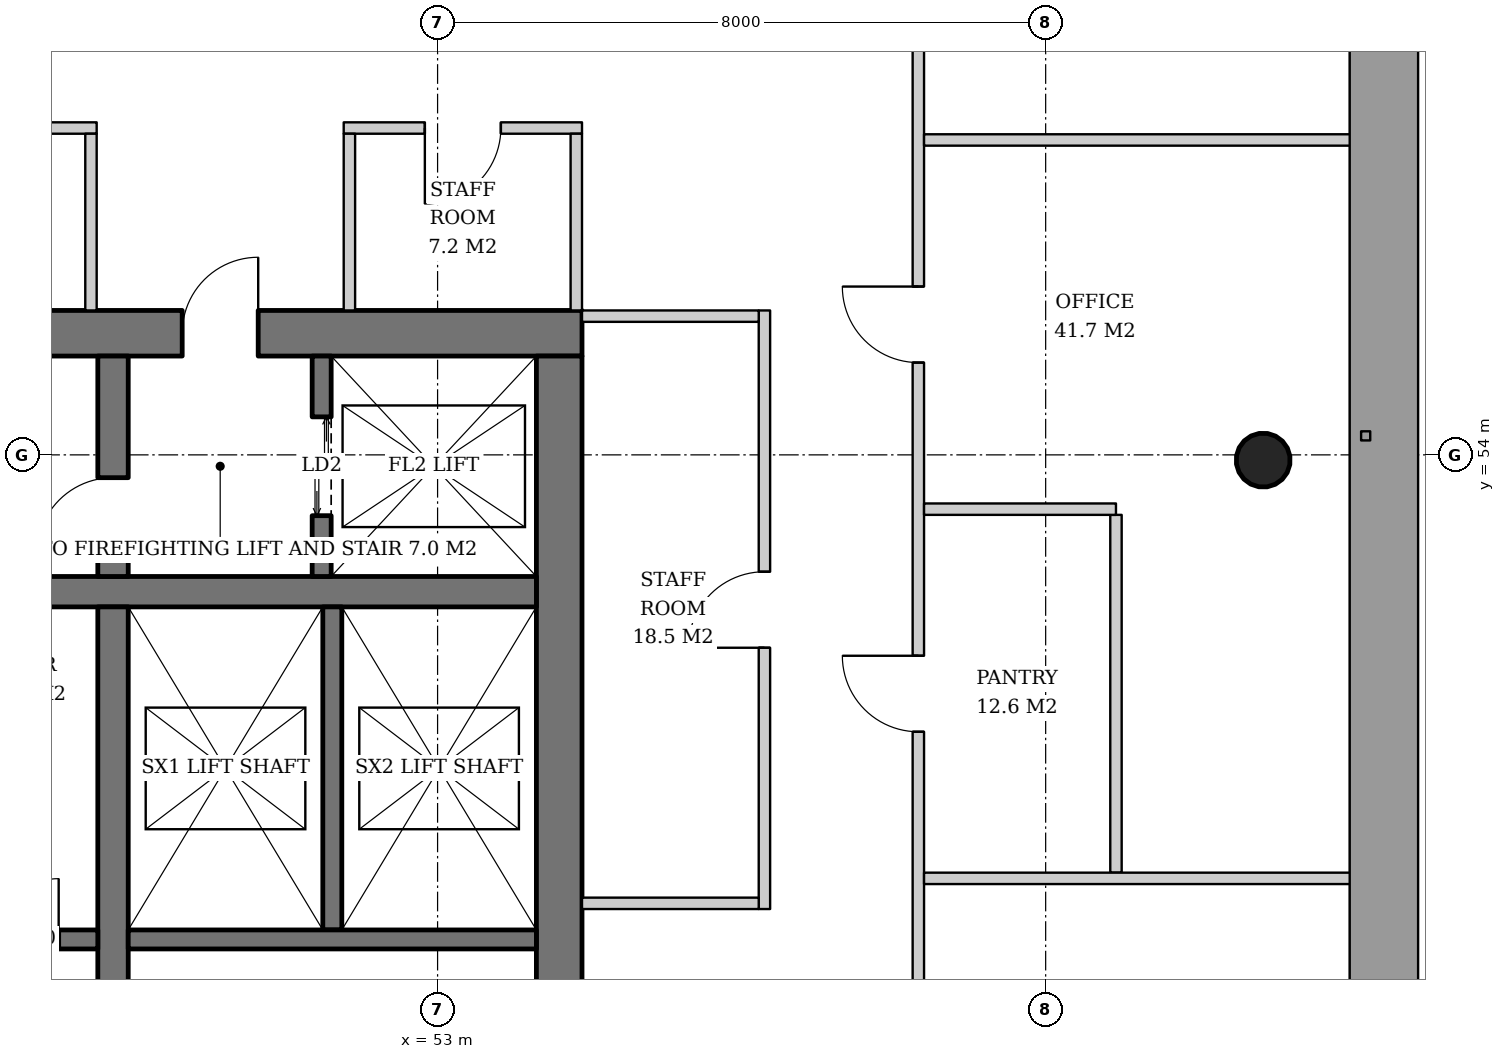
"""IFC4 building model, lengths in metres.
Left out: names, types, materials, properties, quantities, classifications, styles, units other than length and angle.
Written with IfcOpenShell. Run it as: python <this file> out.ifc"""

import sys

from ifc_helpers import new_model, si_unit, direction, frame, frame_2d, origin, origin_2d, place, context, subcontext, project, spatial, rectangle, hollow_circle, extrude, element, fill, save


model = new_model("IFC4")
c1 = context("Model", 3, precision=1e-05, world=origin(), true_north=direction((0.0, 1.0)))
c2 = subcontext(c1, "Body", "Model", "MODEL_VIEW")
j1 = project(units=[si_unit("LENGTHUNIT", "METRE"), si_unit("PLANEANGLEUNIT", "RADIAN")], contexts=[c1])
p1 = place(None, origin())
s1 = spatial("IfcSite", under=j1, at=p1, CompositionType="ELEMENT")
p2 = place(p1, origin())
s2 = spatial("IfcBuilding", under=s1, at=p2, CompositionType="ELEMENT")
p3 = place(p2, frame((0.0, 0.0, 180.6)))
s3 = spatial("IfcBuildingStorey", under=s2, at=p3, CompositionType="ELEMENT", Elevation=180.6)
p4 = place(p3, frame((59.8, 60.8, 0.0), z_axis=(-0.031964207655, -0.031964207655, 0.998977766949), x_axis=(0.707106781187, -0.707106781187, 0.0)))
e1 = element("IfcColumn", 1, at=p4, inside=s3, PredefinedType="COLUMN", context=c2, shape_type="SweptSolid", body=[
    extrude(rectangle(XDim=2.0, YDim=2.0, at=origin_2d()), origin(), (0.0, 0.0, 1.0), 3.804),
])
p5 = place(p3, frame((63.9, 53.95, 0.0), z_axis=(-0.031912349901, -0.015924069971, 0.999363810591), x_axis=(0.446493300058, -0.894786976326, 0.0)))
e2 = element("IfcColumn", 2, at=p5, inside=s3, PredefinedType="COLUMN", context=c2, shape_type="SweptSolid", body=[
    extrude(hollow_circle(Radius=0.355, WallThickness=0.025, at=origin_2d()), origin(), (0.0, 0.0, 1.0), 3.802),
])
p6 = place(p3, frame((35.1, 55.6, 0.0), z_axis=(0.0, 0.0, 1.0), x_axis=(1.0, 0.0, 0.0)))
e3 = element("IfcWall", 3, at=p6, inside=s3, PredefinedType="SHEAR", context=c2, shape_type="SweptSolid", body=[
    extrude(rectangle(XDim=19.8, YDim=0.6, at=frame_2d((9.9, 0.0))), origin(), (0.0, 0.0, 1.0), 3.8),
])
p7 = place(p6, frame((14.54, 0.0, 0.0)))
e4 = element("IfcOpeningElement", 4, at=p7, cuts=e3, PredefinedType="OPENING", context=c2, shape_type="SweptSolid", body=[
    extrude(rectangle(XDim=1.0, YDim=2.1, at=frame_2d((0.5, 1.05))), frame((0.0, 0.31, 0.0), z_axis=(0.0, -1.0, 0.0), x_axis=(1.0, 0.0, 0.0)), (0.0, 0.0, 1.0), 0.62),
])
p8 = place(p6, frame((0.85, 0.0, 0.0)))
e5 = element("IfcOpeningElement", 5, at=p8, cuts=e3, PredefinedType="OPENING", context=c2, shape_type="SweptSolid", body=[
    extrude(rectangle(XDim=1.0, YDim=2.1, at=frame_2d((0.5, 1.05))), frame((0.0, 0.31, 0.0), z_axis=(0.0, -1.0, 0.0), x_axis=(1.0, 0.0, 0.0)), (0.0, 0.0, 1.0), 0.62),
])
p9 = place(p6, frame((2.425, 0.0, 0.0)))
e6 = element("IfcOpeningElement", 6, at=p9, cuts=e3, PredefinedType="OPENING", context=c2, shape_type="SweptSolid", body=[
    extrude(rectangle(XDim=1.0, YDim=2.1, at=frame_2d((0.5, 1.05))), frame((0.0, 0.31, 0.0), z_axis=(0.0, -1.0, 0.0), x_axis=(1.0, 0.0, 0.0)), (0.0, 0.0, 1.0), 0.62),
])
p10 = place(p6, frame((4.012, 0.0, 0.0)))
e7 = element("IfcOpeningElement", 7, at=p10, cuts=e3, PredefinedType="OPENING", context=c2, shape_type="SweptSolid", body=[
    extrude(rectangle(XDim=1.0, YDim=2.1, at=frame_2d((0.5, 1.05))), frame((0.0, 0.31, 0.0), z_axis=(0.0, -1.0, 0.0), x_axis=(1.0, 0.0, 0.0)), (0.0, 0.0, 1.0), 0.62),
])
p11 = place(p3, frame((54.6, 36.7, 0.0), z_axis=(0.0, 0.0, 1.0), x_axis=(0.0, 1.0, 0.0)))
e8 = element("IfcWall", 8, at=p11, inside=s3, PredefinedType="SHEAR", context=c2, shape_type="SweptSolid", body=[
    extrude(rectangle(XDim=18.6, YDim=0.6, at=frame_2d((9.3, 0.0))), origin(), (0.0, 0.0, 1.0), 3.8),
])
p12 = place(p11, frame((8.4, 0.0, 0.0)))
e9 = element("IfcOpeningElement", 9, at=p12, cuts=e8, PredefinedType="OPENING", context=c2, shape_type="SweptSolid", body=[
    extrude(rectangle(XDim=1.8, YDim=2.4, at=frame_2d((0.9, 1.2))), frame((0.0, 0.31, 0.0), z_axis=(0.0, -1.0, 0.0), x_axis=(1.0, 0.0, 0.0)), (0.0, 0.0, 1.0), 0.62),
])
p13 = place(p3, frame((35.7, 52.2, 0.0), z_axis=(0.0, 0.0, 1.0), x_axis=(1.0, 0.0, 0.0)))
e10 = element("IfcWall", 10, at=p13, inside=s3, PredefinedType="SHEAR", context=c2, shape_type="SweptSolid", body=[
    extrude(rectangle(XDim=18.6, YDim=0.4, at=frame_2d((9.3, 0.0))), origin(), (0.0, 0.0, 1.0), 3.8),
])
p14 = place(p3, frame((48.73, 40.0, 0.0), z_axis=(0.0, 0.0, 1.0), x_axis=(0.0, 1.0, 0.0)))
e11 = element("IfcWall", 11, at=p14, inside=s3, PredefinedType="SHEAR", context=c2, shape_type="SweptSolid", body=[
    extrude(rectangle(XDim=12.0, YDim=0.4, at=frame_2d((6.0, 0.0))), origin(), (0.0, 0.0, 1.0), 3.8),
])
p15 = place(p3, frame((48.73, 52.4, 0.0), z_axis=(0.0, 0.0, 1.0), x_axis=(0.0, 1.0, 0.0)))
e12 = element("IfcWall", 12, at=p15, inside=s3, PredefinedType="SHEAR", context=c2, shape_type="SweptSolid", body=[
    extrude(rectangle(XDim=2.9, YDim=0.4, at=frame_2d((1.45, 0.0))), origin(), (0.0, 0.0, 1.0), 3.8),
])
p16 = place(p15, frame((0.3, 0.0, 0.0)))
e13 = element("IfcOpeningElement", 13, at=p16, cuts=e12, PredefinedType="OPENING", context=c2, shape_type="SweptSolid", body=[
    extrude(rectangle(XDim=1.0, YDim=2.1, at=frame_2d((0.5, 1.05))), frame((0.0, 0.21, 0.0), z_axis=(0.0, -1.0, 0.0), x_axis=(1.0, 0.0, 0.0)), (0.0, 0.0, 1.0), 0.42),
])
p17 = place(p3, frame((51.475, 52.4, 0.0), z_axis=(0.0, 0.0, 1.0), x_axis=(0.0, 1.0, 0.0)))
e14 = element("IfcWall", 14, at=p17, inside=s3, PredefinedType="SHEAR", context=c2, shape_type="SweptSolid", body=[
    extrude(rectangle(XDim=2.9, YDim=0.25, at=frame_2d((1.45, 0.0))), origin(), (0.0, 0.0, 1.0), 3.8),
])
p18 = place(p17, frame((0.8, 0.0, 0.0)))
e15 = element("IfcOpeningElement", 15, at=p18, cuts=e14, PredefinedType="OPENING", context=c2, shape_type="SweptSolid", body=[
    extrude(rectangle(XDim=1.3, YDim=2.2, at=frame_2d((0.65, 1.1))), frame((0.0, 0.135, 0.0), z_axis=(0.0, -1.0, 0.0), x_axis=(1.0, 0.0, 0.0)), (0.0, 0.0, 1.0), 0.27),
])
p19 = place(p3, frame((35.7, 47.625, 0.0), z_axis=(0.0, 0.0, 1.0), x_axis=(1.0, 0.0, 0.0)))
e16 = element("IfcWall", 16, at=p19, inside=s3, PredefinedType="SHEAR", context=c2, shape_type="SweptSolid", body=[
    extrude(rectangle(XDim=12.83, YDim=0.25, at=frame_2d((6.415, 0.0))), origin(), (0.0, 0.0, 1.0), 3.8),
])
p20 = place(p19, frame((0.7, 0.0, 0.0)))
e17 = element("IfcOpeningElement", 17, at=p20, cuts=e16, PredefinedType="OPENING", context=c2, shape_type="SweptSolid", body=[
    extrude(rectangle(XDim=1.1, YDim=2.2, at=frame_2d((0.55, 1.1))), frame((0.0, 0.135, 0.0), z_axis=(0.0, -1.0, 0.0), x_axis=(1.0, 0.0, 0.0)), (0.0, 0.0, 1.0), 0.27),
])
p21 = place(p19, frame((3.45, 0.0, 0.0)))
e18 = element("IfcOpeningElement", 18, at=p21, cuts=e16, PredefinedType="OPENING", context=c2, shape_type="SweptSolid", body=[
    extrude(rectangle(XDim=1.1, YDim=2.2, at=frame_2d((0.55, 1.1))), frame((0.0, 0.135, 0.0), z_axis=(0.0, -1.0, 0.0), x_axis=(1.0, 0.0, 0.0)), (0.0, 0.0, 1.0), 0.27),
])
p22 = place(p19, frame((6.2, 0.0, 0.0)))
e19 = element("IfcOpeningElement", 19, at=p22, cuts=e16, PredefinedType="OPENING", context=c2, shape_type="SweptSolid", body=[
    extrude(rectangle(XDim=1.1, YDim=2.2, at=frame_2d((0.55, 1.1))), frame((0.0, 0.135, 0.0), z_axis=(0.0, -1.0, 0.0), x_axis=(1.0, 0.0, 0.0)), (0.0, 0.0, 1.0), 0.27),
])
p23 = place(p19, frame((9.0, 0.0, 0.0)))
e20 = element("IfcOpeningElement", 20, at=p23, cuts=e16, PredefinedType="OPENING", context=c2, shape_type="SweptSolid", body=[
    extrude(rectangle(XDim=1.0, YDim=2.1, at=frame_2d((0.5, 1.05))), frame((0.0, 0.135, 0.0), z_axis=(0.0, -1.0, 0.0), x_axis=(1.0, 0.0, 0.0)), (0.0, 0.0, 1.0), 0.27),
])
p24 = place(p19, frame((11.515, 0.0, 0.0)))
e21 = element("IfcOpeningElement", 21, at=p24, cuts=e16, PredefinedType="OPENING", context=c2, shape_type="SweptSolid", body=[
    extrude(rectangle(XDim=0.8, YDim=2.0, at=frame_2d((0.4, 1.0))), frame((0.0, 0.135, 0.0), z_axis=(0.0, -1.0, 0.0), x_axis=(1.0, 0.0, 0.0)), (0.0, 0.0, 1.0), 0.27),
])
p25 = place(p3, frame((51.615, 47.75, 0.0), z_axis=(0.0, 0.0, 1.0), x_axis=(0.0, 1.0, 0.0)))
e22 = element("IfcWall", 22, at=p25, inside=s3, PredefinedType="SHEAR", context=c2, shape_type="SweptSolid", body=[
    extrude(rectangle(XDim=4.25, YDim=0.25, at=frame_2d((2.125, 0.0))), origin(), (0.0, 0.0, 1.0), 3.8),
])
p26 = place(p3, frame((48.93, 47.625, 0.0), z_axis=(0.0, 0.0, 1.0), x_axis=(1.0, 0.0, 0.0)))
e23 = element("IfcWall", 23, at=p26, inside=s3, PredefinedType="SHEAR", context=c2, shape_type="SweptSolid", body=[
    extrude(rectangle(XDim=5.37, YDim=0.25, at=frame_2d((2.685, 0.0))), origin(), (0.0, 0.0, 1.0), 3.8),
])
p27 = place(p3, frame((57.3, 48.025, 0.0), z_axis=(0.0, 0.0, 1.0), x_axis=(0.0, 1.0, 0.0)))
e24 = element("IfcWall", 24, at=p27, inside=s3, PredefinedType="PARTITIONING", context=c2, shape_type="SweptSolid", body=[
    extrude(rectangle(XDim=7.875, YDim=0.15, at=frame_2d((3.938, 0.0))), origin(), (0.0, 0.0, 1.0), 2.867),
])
p28 = place(p27, frame((3.438, 0.0, 0.0)))
e25 = element("IfcOpeningElement", 25, at=p28, cuts=e24, PredefinedType="OPENING", context=c2, shape_type="SweptSolid", body=[
    extrude(rectangle(XDim=1.0, YDim=2.1, at=frame_2d((0.5, 1.05))), frame((0.0, 0.085, 0.0), z_axis=(0.0, -1.0, 0.0), x_axis=(1.0, 0.0, 0.0)), (0.0, 0.0, 1.0), 0.17),
])
for number, where, z_axis, x_axis in (
    (26, (54.9, 48.1, 0.0), (0.0, 0.0, 1.0), (1.0, 0.0, 0.0)),
    (27, (54.9, 55.825, 0.0), (0.0, 0.0, 1.0), (1.0, 0.0, 0.0)),
):
    element("IfcWall", number, at=place(p3, frame(where, z_axis=z_axis, x_axis=x_axis)), inside=s3, PredefinedType="PARTITIONING", context=c2, shape_type="SweptSolid", body=[
        extrude(rectangle(XDim=2.325, YDim=0.15, at=frame_2d((1.163, 0.0))), origin(), (0.0, 0.0, 1.0), 3.62),
    ])
p29 = place(p3, frame((54.9, 58.3, 0.0), z_axis=(0.0, 0.0, 1.0), x_axis=(-1.0, 0.0, 0.0)))
e28 = element("IfcWall", 28, at=p29, inside=s3, PredefinedType="PARTITIONING", context=c2, shape_type="SweptSolid", body=[
    extrude(rectangle(XDim=3.135, YDim=0.15, at=frame_2d((1.567, 0.0))), origin(), (0.0, 0.0, 1.0), 2.92),
])
p30 = place(p29, frame((1.067, 0.0, 0.0)))
e29 = element("IfcOpeningElement", 29, at=p30, cuts=e28, PredefinedType="OPENING", context=c2, shape_type="SweptSolid", body=[
    extrude(rectangle(XDim=1.0, YDim=2.1, at=frame_2d((0.5, 1.05))), frame((0.0, 0.085, 0.0), z_axis=(0.0, -1.0, 0.0), x_axis=(1.0, 0.0, 0.0)), (0.0, 0.0, 1.0), 0.17),
])
p31 = place(p3, frame((54.825, 55.9, 0.0), z_axis=(0.0, 0.0, 1.0), x_axis=(0.0, 1.0, 0.0)))
e30 = element("IfcWall", 30, at=p31, inside=s3, PredefinedType="PARTITIONING", context=c2, shape_type="SweptSolid", body=[
    extrude(rectangle(XDim=2.325, YDim=0.15, at=frame_2d((1.163, 0.0))), origin(), (0.0, 0.0, 1.0), 2.867),
])
p32 = place(p3, frame((51.84, 55.9, 0.0), z_axis=(0.0, 0.0, 1.0), x_axis=(0.0, 1.0, 0.0)))
e31 = element("IfcWall", 31, at=p32, inside=s3, PredefinedType="PARTITIONING", context=c2, shape_type="SweptSolid", body=[
    extrude(rectangle(XDim=2.325, YDim=0.15, at=frame_2d((1.163, 0.0))), origin(), (0.0, 0.0, 1.0), 3.62),
])
p33 = place(p3, frame((48.515, 58.3, 0.0), z_axis=(0.0, 0.0, 1.0), x_axis=(-1.0, 0.0, 0.0)))
e32 = element("IfcWall", 32, at=p33, inside=s3, PredefinedType="PARTITIONING", context=c2, shape_type="SweptSolid", body=[
    extrude(rectangle(XDim=7.278, YDim=0.15, at=frame_2d((3.639, 0.0))), origin(), (0.0, 0.0, 1.0), 2.867),
])
p34 = place(p33, frame((3.139, 0.0, 0.0)))
e33 = element("IfcOpeningElement", 33, at=p34, cuts=e32, PredefinedType="OPENING", context=c2, shape_type="SweptSolid", body=[
    extrude(rectangle(XDim=1.0, YDim=2.1, at=frame_2d((0.5, 1.05))), frame((0.0, 0.085, 0.0), z_axis=(0.0, -1.0, 0.0), x_axis=(1.0, 0.0, 0.0)), (0.0, 0.0, 1.0), 0.17),
])
p35 = place(p3, frame((48.44, 55.9, 0.0), z_axis=(0.0, 0.0, 1.0), x_axis=(0.0, 1.0, 0.0)))
e34 = element("IfcWall", 34, at=p35, inside=s3, PredefinedType="PARTITIONING", context=c2, shape_type="SweptSolid", body=[
    extrude(rectangle(XDim=2.325, YDim=0.15, at=frame_2d((1.163, 0.0))), origin(), (0.0, 0.0, 1.0), 3.62),
])
p36 = place(p3, frame((61.925, 48.504, 0.0), z_axis=(0.0, 0.0, 1.0), x_axis=(0.0, 1.0, 0.0)))
e35 = element("IfcWall", 35, at=p36, inside=s3, PredefinedType="PARTITIONING", context=c2, shape_type="SweptSolid", body=[
    extrude(rectangle(XDim=4.707, YDim=0.15, at=frame_2d((2.354, 0.0))), origin(), (0.0, 0.0, 1.0), 2.867),
])
p37 = place(p3, frame((59.325, 32.457, 0.0), z_axis=(0.0, 0.0, 1.0), x_axis=(0.0, 1.0, 0.0)))
e36 = element("IfcWall", 36, at=p37, inside=s3, PredefinedType="PARTITIONING", context=c2, shape_type="SweptSolid", body=[
    extrude(rectangle(XDim=27.086, YDim=0.15, at=frame_2d((13.543, 0.0))), origin(), (0.0, 0.0, 1.0), 2.867),
])
p38 = place(p37, frame((3.329, 0.0, 0.0)))
e37 = element("IfcOpeningElement", 37, at=p38, cuts=e36, PredefinedType="OPENING", context=c2, shape_type="SweptSolid", body=[
    extrude(rectangle(XDim=1.0, YDim=2.1, at=frame_2d((0.5, 1.05))), frame((0.0, 0.085, 0.0), z_axis=(0.0, -1.0, 0.0), x_axis=(1.0, 0.0, 0.0)), (0.0, 0.0, 1.0), 0.17),
])
p39 = place(p37, frame((8.186, 0.0, 0.0)))
e38 = element("IfcOpeningElement", 38, at=p39, cuts=e36, PredefinedType="OPENING", context=c2, shape_type="SweptSolid", body=[
    extrude(rectangle(XDim=1.0, YDim=2.1, at=frame_2d((0.5, 1.05))), frame((0.0, 0.085, 0.0), z_axis=(0.0, -1.0, 0.0), x_axis=(1.0, 0.0, 0.0)), (0.0, 0.0, 1.0), 0.17),
])
p40 = place(p37, frame((13.043, 0.0, 0.0)))
e39 = element("IfcOpeningElement", 39, at=p40, cuts=e36, PredefinedType="OPENING", context=c2, shape_type="SweptSolid", body=[
    extrude(rectangle(XDim=1.0, YDim=2.1, at=frame_2d((0.5, 1.05))), frame((0.0, 0.085, 0.0), z_axis=(0.0, -1.0, 0.0), x_axis=(1.0, 0.0, 0.0)), (0.0, 0.0, 1.0), 0.17),
])
p41 = place(p37, frame((17.9, 0.0, 0.0)))
e40 = element("IfcOpeningElement", 40, at=p41, cuts=e36, PredefinedType="OPENING", context=c2, shape_type="SweptSolid", body=[
    extrude(rectangle(XDim=1.0, YDim=2.1, at=frame_2d((0.5, 1.05))), frame((0.0, 0.085, 0.0), z_axis=(0.0, -1.0, 0.0), x_axis=(1.0, 0.0, 0.0)), (0.0, 0.0, 1.0), 0.17),
])
p42 = place(p37, frame((22.757, 0.0, 0.0)))
e41 = element("IfcOpeningElement", 41, at=p42, cuts=e36, PredefinedType="OPENING", context=c2, shape_type="SweptSolid", body=[
    extrude(rectangle(XDim=1.0, YDim=2.1, at=frame_2d((0.5, 1.05))), frame((0.0, 0.085, 0.0), z_axis=(0.0, -1.0, 0.0), x_axis=(1.0, 0.0, 0.0)), (0.0, 0.0, 1.0), 0.17),
])
p43 = place(p3, frame((59.4, 48.428, 0.0), z_axis=(0.0, 0.0, 1.0), x_axis=(1.0, 0.0, 0.0)))
e42 = element("IfcWall", 42, at=p43, inside=s3, PredefinedType="PARTITIONING", context=c2, shape_type="SweptSolid", body=[
    extrude(rectangle(XDim=5.64, YDim=0.15, at=frame_2d((2.82, 0.0))), origin(), (0.0, 0.0, 1.0), 2.867),
])
p44 = place(p3, frame((59.4, 53.286, 0.0), z_axis=(0.0, 0.0, 1.0), x_axis=(1.0, 0.0, 0.0)))
e43 = element("IfcWall", 43, at=p44, inside=s3, PredefinedType="PARTITIONING", context=c2, shape_type="SweptSolid", body=[
    extrude(rectangle(XDim=2.525, YDim=0.15, at=frame_2d((1.263, 0.0))), origin(), (0.0, 0.0, 1.0), 3.62),
])
p45 = place(p3, frame((59.4, 58.143, 0.0), z_axis=(0.0, 0.0, 1.0), x_axis=(1.0, 0.0, 0.0)))
e44 = element("IfcWall", 44, at=p45, inside=s3, PredefinedType="PARTITIONING", context=c2, shape_type="SweptSolid", body=[
    extrude(rectangle(XDim=5.64, YDim=0.15, at=frame_2d((2.82, 0.0))), origin(), (0.0, 0.0, 1.0), 3.12),
])
p46 = place(p18, origin())
e45 = element("IfcDoor", 45, at=p46, inside=s3, OperationType="DOUBLE_DOOR_SLIDING", PredefinedType="DOOR", context=c2, shape_type="SweptSolid", body=[
    extrude(rectangle(XDim=1.3, YDim=2.2, at=frame_2d((0.65, 1.1))), frame((0.0, 0.025, 0.0), z_axis=(0.0, -1.0, 0.0), x_axis=(1.0, 0.0, 0.0)), (0.0, 0.0, 1.0), 0.05),
])
fill(e15, e45)
p47 = place(p24, origin())
e46 = element("IfcDoor", 46, at=p47, inside=s3, OperationType="SINGLE_SWING_RIGHT", PredefinedType="DOOR", context=c2, shape_type="SweptSolid", body=[
    extrude(rectangle(XDim=0.8, YDim=2.0, at=frame_2d((0.4, 1.0))), frame((0.0, 0.025, 0.0), z_axis=(0.0, -1.0, 0.0), x_axis=(1.0, 0.0, 0.0)), (0.0, 0.0, 1.0), 0.05),
])
fill(e21, e46)
p48 = place(p16, origin())
e47 = element("IfcDoor", 47, at=p48, inside=s3, OperationType="SINGLE_SWING_LEFT", PredefinedType="DOOR", context=c2, shape_type="SweptSolid", body=[
    extrude(rectangle(XDim=1.0, YDim=2.1, at=frame_2d((0.5, 1.05))), frame((0.0, 0.025, 0.0), z_axis=(0.0, -1.0, 0.0), x_axis=(1.0, 0.0, 0.0)), (0.0, 0.0, 1.0), 0.05),
])
fill(e13, e47)
p49 = place(p7, origin())
e48 = element("IfcDoor", 48, at=p49, inside=s3, OperationType="SINGLE_SWING_RIGHT", PredefinedType="DOOR", context=c2, shape_type="SweptSolid", body=[
    extrude(rectangle(XDim=1.0, YDim=2.1, at=frame_2d((0.5, 1.05))), frame((0.0, 0.025, 0.0), z_axis=(0.0, -1.0, 0.0), x_axis=(1.0, 0.0, 0.0)), (0.0, 0.0, 1.0), 0.05),
])
fill(e4, e48)
p50 = place(p28, origin())
e49 = element("IfcDoor", 49, at=p50, inside=s3, OperationType="SINGLE_SWING_LEFT", PredefinedType="DOOR", context=c2, shape_type="SweptSolid", body=[
    extrude(rectangle(XDim=1.0, YDim=2.1, at=frame_2d((0.5, 1.05))), frame((0.0, 0.025, 0.0), z_axis=(0.0, -1.0, 0.0), x_axis=(1.0, 0.0, 0.0)), (0.0, 0.0, 1.0), 0.05),
])
fill(e25, e49)
p51 = place(p30, origin())
e50 = element("IfcDoor", 50, at=p51, inside=s3, OperationType="SINGLE_SWING_RIGHT", PredefinedType="DOOR", context=c2, shape_type="SweptSolid", body=[
    extrude(rectangle(XDim=1.0, YDim=2.1, at=frame_2d((0.5, 1.05))), frame((0.0, 0.025, 0.0), z_axis=(0.0, -1.0, 0.0), x_axis=(1.0, 0.0, 0.0)), (0.0, 0.0, 1.0), 0.05),
])
fill(e29, e50)
p52 = place(p41, origin())
e51 = element("IfcDoor", 51, at=p52, inside=s3, OperationType="SINGLE_SWING_RIGHT", PredefinedType="DOOR", context=c2, shape_type="SweptSolid", body=[
    extrude(rectangle(XDim=1.0, YDim=2.1, at=frame_2d((0.5, 1.05))), frame((0.0, 0.025, 0.0), z_axis=(0.0, -1.0, 0.0), x_axis=(1.0, 0.0, 0.0)), (0.0, 0.0, 1.0), 0.05),
])
fill(e40, e51)
p53 = place(p42, origin())
e52 = element("IfcDoor", 52, at=p53, inside=s3, OperationType="SINGLE_SWING_RIGHT", PredefinedType="DOOR", context=c2, shape_type="SweptSolid", body=[
    extrude(rectangle(XDim=1.0, YDim=2.1, at=frame_2d((0.5, 1.05))), frame((0.0, 0.025, 0.0), z_axis=(0.0, -1.0, 0.0), x_axis=(1.0, 0.0, 0.0)), (0.0, 0.0, 1.0), 0.05),
])
fill(e41, e52)
save(model, sys.argv[1])
